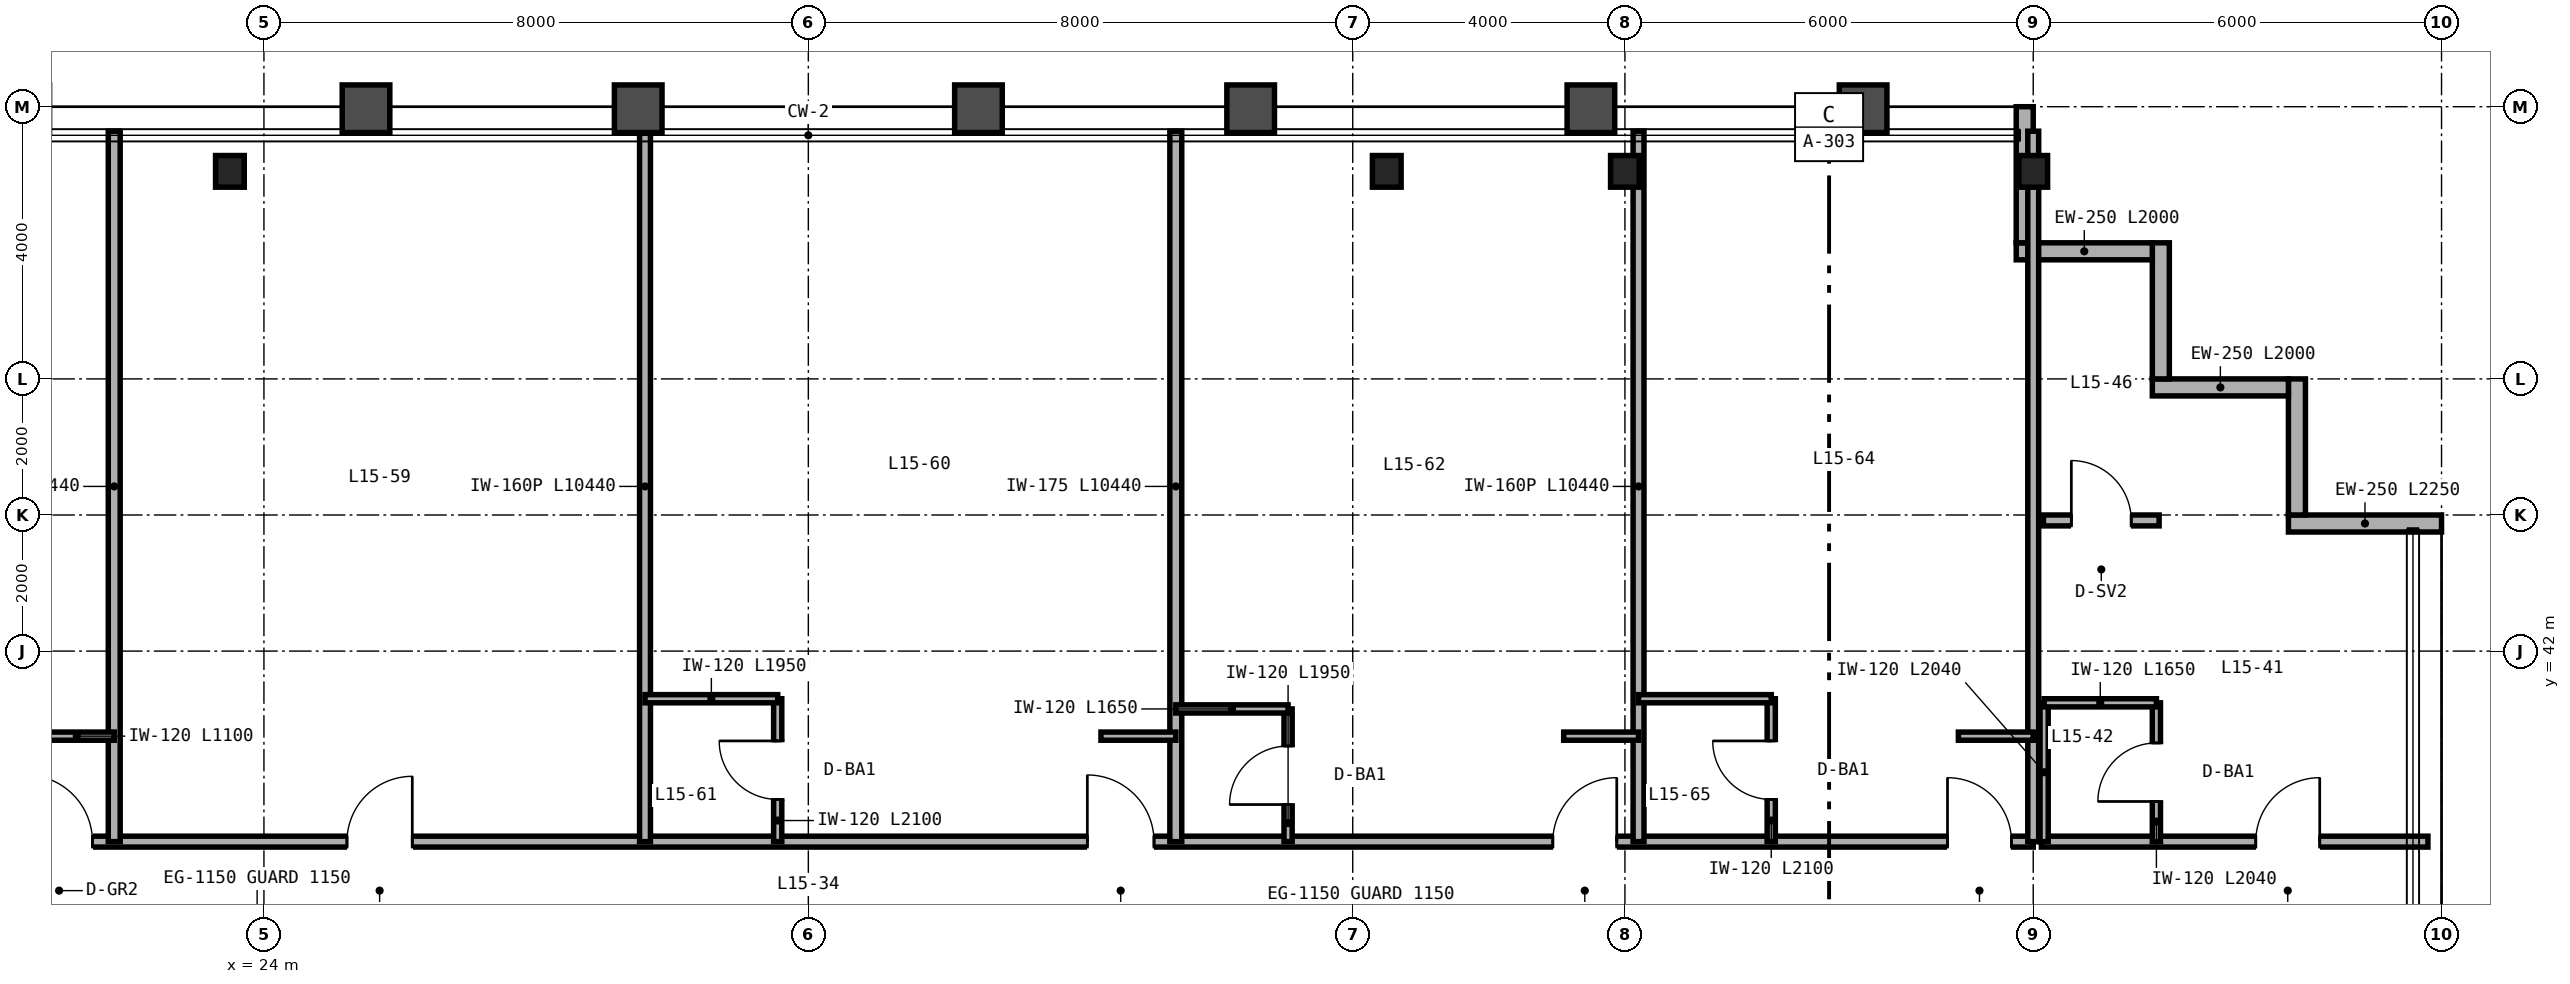
"""IFC4 building model, lengths in metres.
Left out: names, types, materials, properties, quantities, classifications, styles, units other than length and angle.
Written with IfcOpenShell. Run it as: python <this file> out.ifc"""

import sys

from ifc_helpers import new_model, si_unit, direction, frame, frame_2d, origin, origin_2d, place, context, subcontext, project, spatial, rectangle, i_section, extrude, source, transform, mapped, element, fill, save


model = new_model("IFC4")
c1 = context("Model", 3, precision=1e-05, world=origin(), true_north=direction((0.0, 1.0)))
c2 = subcontext(c1, "Body", "Model", "MODEL_VIEW")
j1 = project(units=[si_unit("LENGTHUNIT", "METRE"), si_unit("PLANEANGLEUNIT", "RADIAN")], contexts=[c1])
p1 = place(None, origin())
s1 = spatial("IfcSite", under=j1, at=p1, CompositionType="ELEMENT")
p2 = place(p1, origin())
s2 = spatial("IfcBuilding", under=s1, at=p2, CompositionType="ELEMENT")
p3 = place(p2, frame((0.0, 0.0, 63.6)))
s3 = spatial("IfcBuildingStorey", under=s2, at=p3, CompositionType="ELEMENT", Elevation=63.6)
m1 = source(origin(), c2, "Body", "SweptSolid", [
    extrude(i_section(OverallWidth=0.422, OverallDepth=0.465, WebThickness=0.045, FlangeThickness=0.073, FilletRadius=0.025, at=origin_2d()), origin(), (0.0, 0.0, 1.0), 3.35),
])
for number, where, z_axis, x_axis in (
    (1, (23.5, 49.05, 0.0), (0.0, 0.0, 1.0), (1.0, 0.0, 0.0)),
    (2, (40.5, 49.05, 0.0), (0.0, 0.0, 1.0), (1.0, 0.0, 0.0)),
    (3, (44.0, 49.05, 0.0), (0.0, 0.0, 1.0), (1.0, 0.0, 0.0)),
    (4, (50.0, 49.05, 0.0), (0.0, 0.0, 1.0), (1.0, 0.0, 0.0)),
):
    element("IfcColumn", number, at=place(p3, frame(where, z_axis=z_axis, x_axis=x_axis)), inside=s3, PredefinedType="COLUMN", context=c2, shape_type="MappedRepresentation", body=[
        mapped(m1, transform((0.0, 0.0, 0.0), scale=1.0)),
    ])
p4 = place(p3, frame((56.0, 43.875, 0.0), z_axis=(0.0, 0.0, 1.0), x_axis=(-1.0, 0.0, 0.0)))
e5 = element("IfcWall", 5, at=p4, inside=s3, PredefinedType="SOLIDWALL", context=c2, shape_type="SweptSolid", body=[
    extrude(rectangle(XDim=2.25, YDim=0.25, at=frame_2d((1.125, 0.0))), origin(), (0.0, 0.0, 1.0), 3.35),
])
for number, where, z_axis, x_axis in (
    (6, (53.875, 44.0, 0.0), (0.0, 0.0, 1.0), (0.0, 1.0, 0.0)),
    (7, (53.75, 45.875, 0.0), (0.0, 0.0, 1.0), (-1.0, 0.0, 0.0)),
    (8, (51.875, 46.0, 0.0), (0.0, 0.0, 1.0), (0.0, 1.0, 0.0)),
    (9, (51.75, 47.875, 0.0), (0.0, 0.0, 1.0), (-1.0, 0.0, 0.0)),
):
    element("IfcWall", number, at=place(p3, frame(where, z_axis=z_axis, x_axis=x_axis)), inside=s3, PredefinedType="SOLIDWALL", context=c2, shape_type="SweptSolid", body=[
        extrude(rectangle(XDim=2.0, YDim=0.25, at=frame_2d((1.0, 0.0))), origin(), (0.0, 0.0, 1.0), 3.35),
    ])
p5 = place(p3, frame((49.875, 48.0, 0.0), z_axis=(0.0, 0.0, 1.0), x_axis=(0.0, 1.0, 0.0)))
e10 = element("IfcWall", 10, at=p5, inside=s3, PredefinedType="SOLIDWALL", context=c2, shape_type="SweptSolid", body=[
    extrude(rectangle(XDim=2.0, YDim=0.25, at=frame_2d((1.0, 0.0))), origin(), (0.0, 0.0, 1.0), 2.657),
])
p6 = place(p3, frame((50.12, 39.2, 0.0), z_axis=(0.0, 0.0, 1.0), x_axis=(1.0, 0.0, 0.0)))
e11 = element("IfcWall", 11, at=p6, inside=s3, PredefinedType="PARTITIONING", context=c2, shape_type="SweptSolid", body=[
    extrude(rectangle(XDim=5.68, YDim=0.16, at=frame_2d((2.84, 0.0))), origin(), (0.0, 0.0, 1.0), 3.35),
])
p7 = place(p6, frame((3.15, 0.0, 0.0)))
e12 = element("IfcOpeningElement", 12, at=p7, cuts=e11, PredefinedType="OPENING", context=c2, shape_type="SweptSolid", body=[
    extrude(rectangle(XDim=0.94, YDim=2.15, at=frame_2d((0.47, 1.075))), frame((0.0, 0.09, 0.0), z_axis=(0.0, -1.0, 0.0), x_axis=(1.0, 0.0, 0.0)), (0.0, 0.0, 1.0), 0.18),
])
p8 = place(p3, frame((51.81, 39.2, 0.0), z_axis=(0.0, 0.0, 1.0), x_axis=(0.0, 1.0, 0.0)))
e13 = element("IfcWall", 13, at=p8, inside=s3, PredefinedType="PARTITIONING", context=c2, shape_type="SweptSolid", body=[
    extrude(rectangle(XDim=2.04, YDim=0.12, at=frame_2d((1.02, 0.0))), origin(), (0.0, 0.0, 1.0), 3.35),
])
p9 = place(p8, frame((0.59, 0.0, 0.0)))
e14 = element("IfcOpeningElement", 14, at=p9, cuts=e13, PredefinedType="OPENING", context=c2, shape_type="SweptSolid", body=[
    extrude(rectangle(XDim=0.86, YDim=2.1, at=frame_2d((0.43, 1.05))), frame((0.0, 0.07, 0.0), z_axis=(0.0, -1.0, 0.0), x_axis=(1.0, 0.0, 0.0)), (0.0, 0.0, 1.0), 0.14),
])
p10 = place(p3, frame((50.16, 39.2, 0.0), z_axis=(0.0, 0.0, 1.0), x_axis=(0.0, 1.0, 0.0)))
e15 = element("IfcWall", 15, at=p10, inside=s3, PredefinedType="PARTITIONING", context=c2, shape_type="SweptSolid", body=[
    extrude(rectangle(XDim=2.04, YDim=0.12, at=frame_2d((1.02, 0.0))), origin(), (0.0, 0.0, 1.0), 3.35),
])
p11 = place(p3, frame((50.16, 41.24, 0.0), z_axis=(0.0, 0.0, 1.0), x_axis=(1.0, 0.0, 0.0)))
e16 = element("IfcWall", 16, at=p11, inside=s3, PredefinedType="PARTITIONING", context=c2, shape_type="SweptSolid", body=[
    extrude(rectangle(XDim=1.65, YDim=0.12, at=frame_2d((0.825, 0.0))), origin(), (0.0, 0.0, 1.0), 3.35),
])
p12 = place(p3, frame((50.15, 43.92, 0.0), z_axis=(0.0, 0.0, 1.0), x_axis=(1.0, 0.0, 0.0)))
e17 = element("IfcWall", 17, at=p12, inside=s3, PredefinedType="PARTITIONING", context=c2, shape_type="SweptSolid", body=[
    extrude(rectangle(XDim=1.7, YDim=0.16, at=frame_2d((0.85, 0.0))), origin(), (0.0, 0.0, 1.0), 3.35),
])
p13 = place(p12, frame((0.41, 0.0, 0.0)))
e18 = element("IfcOpeningElement", 18, at=p13, cuts=e17, PredefinedType="OPENING", context=c2, shape_type="SweptSolid", body=[
    extrude(rectangle(XDim=0.88, YDim=2.15, at=frame_2d((0.44, 1.075))), frame((0.0, 0.09, 0.0), z_axis=(0.0, -1.0, 0.0), x_axis=(1.0, 0.0, 0.0)), (0.0, 0.0, 1.0), 0.18),
])
p14 = place(p3, frame((14.0, 39.2, 0.0), z_axis=(0.0, 0.0, 1.0), x_axis=(1.0, 0.0, 0.0)))
e19 = element("IfcWall", 19, at=p14, inside=s3, PredefinedType="PARTITIONING", context=c2, shape_type="SweptSolid", body=[
    extrude(rectangle(XDim=36.0, YDim=0.16, at=frame_2d((18.0, 0.0))), origin(), (0.0, 0.0, 1.0), 2.571),
])
p15 = place(p14, frame((6.5, 0.0, 0.0)))
e20 = element("IfcOpeningElement", 20, at=p15, cuts=e19, PredefinedType="OPENING", context=c2, shape_type="SweptSolid", body=[
    extrude(rectangle(XDim=0.98, YDim=2.2, at=frame_2d((0.49, 1.1))), frame((0.0, 0.09, 0.0), z_axis=(0.0, -1.0, 0.0), x_axis=(1.0, 0.0, 0.0)), (0.0, 0.0, 1.0), 0.18),
])
p16 = place(p14, frame((11.22, 0.0, 0.0)))
e21 = element("IfcOpeningElement", 21, at=p16, cuts=e19, PredefinedType="OPENING", context=c2, shape_type="SweptSolid", body=[
    extrude(rectangle(XDim=0.96, YDim=2.15, at=frame_2d((0.48, 1.075))), frame((0.0, 0.09, 0.0), z_axis=(0.0, -1.0, 0.0), x_axis=(1.0, 0.0, 0.0)), (0.0, 0.0, 1.0), 0.18),
])
p17 = place(p14, frame((22.1, 0.0, 0.0)))
e22 = element("IfcOpeningElement", 22, at=p17, cuts=e19, PredefinedType="OPENING", context=c2, shape_type="SweptSolid", body=[
    extrude(rectangle(XDim=0.98, YDim=2.2, at=frame_2d((0.49, 1.1))), frame((0.0, 0.09, 0.0), z_axis=(0.0, -1.0, 0.0), x_axis=(1.0, 0.0, 0.0)), (0.0, 0.0, 1.0), 0.18),
])
p18 = place(p14, frame((28.94, 0.0, 0.0)))
e23 = element("IfcOpeningElement", 23, at=p18, cuts=e19, PredefinedType="OPENING", context=c2, shape_type="SweptSolid", body=[
    extrude(rectangle(XDim=0.94, YDim=2.15, at=frame_2d((0.47, 1.075))), frame((0.0, 0.09, 0.0), z_axis=(0.0, -1.0, 0.0), x_axis=(1.0, 0.0, 0.0)), (0.0, 0.0, 1.0), 0.18),
])
p19 = place(p14, frame((34.74, 0.0, 0.0)))
e24 = element("IfcOpeningElement", 24, at=p19, cuts=e19, PredefinedType="OPENING", context=c2, shape_type="SweptSolid", body=[
    extrude(rectangle(XDim=0.94, YDim=2.15, at=frame_2d((0.47, 1.075))), frame((0.0, 0.09, 0.0), z_axis=(0.0, -1.0, 0.0), x_axis=(1.0, 0.0, 0.0)), (0.0, 0.0, 1.0), 0.18),
])
p20 = place(p3, frame((50.0, 39.2, 0.0), z_axis=(0.0, 0.0, 1.0), x_axis=(0.0, 1.0, 0.0)))
e25 = element("IfcWall", 25, at=p20, inside=s3, PredefinedType="PARTITIONING", context=c2, shape_type="SweptSolid", body=[
    extrude(rectangle(XDim=10.44, YDim=0.16, at=frame_2d((5.22, 0.0))), origin(), (0.0, 0.0, 1.0), 2.657),
])
p21 = place(p3, frame((21.8, 39.2, 0.0), z_axis=(0.0, 0.0, 1.0), x_axis=(0.0, 1.0, 0.0)))
e26 = element("IfcWall", 26, at=p21, inside=s3, PredefinedType="PARTITIONING", context=c2, shape_type="SweptSolid", body=[
    extrude(rectangle(XDim=10.44, YDim=0.175, at=frame_2d((5.22, 0.0))), origin(), (0.0, 0.0, 1.0), 2.813),
])
p22 = place(p3, frame((20.7, 40.75, 0.0), z_axis=(0.0, 0.0, 1.0), x_axis=(1.0, 0.0, 0.0)))
e27 = element("IfcWall", 27, at=p22, inside=s3, PredefinedType="PARTITIONING", context=c2, shape_type="SweptSolid", body=[
    extrude(rectangle(XDim=1.1, YDim=0.12, at=frame_2d((0.55, 0.0))), origin(), (0.0, 0.0, 1.0), 3.35),
])
p23 = place(p3, frame((29.6, 39.2, 0.0), z_axis=(0.0, 0.0, 1.0), x_axis=(0.0, 1.0, 0.0)))
e28 = element("IfcWall", 28, at=p23, inside=s3, PredefinedType="PARTITIONING", context=c2, shape_type="SweptSolid", body=[
    extrude(rectangle(XDim=10.44, YDim=0.16, at=frame_2d((5.22, 0.0))), origin(), (0.0, 0.0, 1.0), 2.423),
])
p24 = place(p3, frame((37.4, 39.2, 0.0), z_axis=(0.0, 0.0, 1.0), x_axis=(0.0, 1.0, 0.0)))
e29 = element("IfcWall", 29, at=p24, inside=s3, PredefinedType="PARTITIONING", context=c2, shape_type="SweptSolid", body=[
    extrude(rectangle(XDim=10.44, YDim=0.175, at=frame_2d((5.22, 0.0))), origin(), (0.0, 0.0, 1.0), 2.423),
])
p25 = place(p3, frame((31.55, 39.2, 0.0), z_axis=(0.0, 0.0, 1.0), x_axis=(0.0, 1.0, 0.0)))
e30 = element("IfcWall", 30, at=p25, inside=s3, PredefinedType="PARTITIONING", context=c2, shape_type="SweptSolid", body=[
    extrude(rectangle(XDim=2.1, YDim=0.12, at=frame_2d((1.05, 0.0))), origin(), (0.0, 0.0, 1.0), 3.35),
])
p26 = place(p25, frame((0.62, 0.0, 0.0)))
e31 = element("IfcOpeningElement", 31, at=p26, cuts=e30, PredefinedType="OPENING", context=c2, shape_type="SweptSolid", body=[
    extrude(rectangle(XDim=0.86, YDim=2.1, at=frame_2d((0.43, 1.05))), frame((0.0, 0.07, 0.0), z_axis=(0.0, -1.0, 0.0), x_axis=(1.0, 0.0, 0.0)), (0.0, 0.0, 1.0), 0.14),
])
p27 = place(p3, frame((29.6, 41.3, 0.0), z_axis=(0.0, 0.0, 1.0), x_axis=(1.0, 0.0, 0.0)))
e32 = element("IfcWall", 32, at=p27, inside=s3, PredefinedType="PARTITIONING", context=c2, shape_type="SweptSolid", body=[
    extrude(rectangle(XDim=1.95, YDim=0.12, at=frame_2d((0.975, 0.0))), origin(), (0.0, 0.0, 1.0), 3.35),
])
p28 = place(p3, frame((36.3, 40.75, 0.0), z_axis=(0.0, 0.0, 1.0), x_axis=(1.0, 0.0, 0.0)))
e33 = element("IfcWall", 33, at=p28, inside=s3, PredefinedType="PARTITIONING", context=c2, shape_type="SweptSolid", body=[
    extrude(rectangle(XDim=1.1, YDim=0.12, at=frame_2d((0.55, 0.0))), origin(), (0.0, 0.0, 1.0), 3.35),
])
p29 = place(p3, frame((44.2, 39.2, 0.0), z_axis=(0.0, 0.0, 1.0), x_axis=(0.0, 1.0, 0.0)))
e34 = element("IfcWall", 34, at=p29, inside=s3, PredefinedType="PARTITIONING", context=c2, shape_type="SweptSolid", body=[
    extrude(rectangle(XDim=10.44, YDim=0.16, at=frame_2d((5.22, 0.0))), origin(), (0.0, 0.0, 1.0), 2.657),
])
p30 = place(p3, frame((39.05, 39.2, 0.0), z_axis=(0.0, 0.0, 1.0), x_axis=(0.0, 1.0, 0.0)))
e35 = element("IfcWall", 35, at=p30, inside=s3, PredefinedType="PARTITIONING", context=c2, shape_type="SweptSolid", body=[
    extrude(rectangle(XDim=1.95, YDim=0.12, at=frame_2d((0.975, 0.0))), origin(), (0.0, 0.0, 1.0), 3.35),
])
p31 = place(p30, frame((0.545, 0.0, 0.0)))
e36 = element("IfcOpeningElement", 36, at=p31, cuts=e35, PredefinedType="OPENING", context=c2, shape_type="SweptSolid", body=[
    extrude(rectangle(XDim=0.86, YDim=2.1, at=frame_2d((0.43, 1.05))), frame((0.0, 0.07, 0.0), z_axis=(0.0, -1.0, 0.0), x_axis=(1.0, 0.0, 0.0)), (0.0, 0.0, 1.0), 0.14),
])
p32 = place(p3, frame((37.4, 41.15, 0.0), z_axis=(0.0, 0.0, 1.0), x_axis=(1.0, 0.0, 0.0)))
e37 = element("IfcWall", 37, at=p32, inside=s3, PredefinedType="PARTITIONING", context=c2, shape_type="SweptSolid", body=[
    extrude(rectangle(XDim=1.65, YDim=0.12, at=frame_2d((0.825, 0.0))), origin(), (0.0, 0.0, 1.0), 3.35),
])
p33 = place(p3, frame((43.1, 40.75, 0.0), z_axis=(0.0, 0.0, 1.0), x_axis=(1.0, 0.0, 0.0)))
e38 = element("IfcWall", 38, at=p33, inside=s3, PredefinedType="PARTITIONING", context=c2, shape_type="SweptSolid", body=[
    extrude(rectangle(XDim=1.1, YDim=0.12, at=frame_2d((0.55, 0.0))), origin(), (0.0, 0.0, 1.0), 3.35),
])
p34 = place(p3, frame((46.15, 39.2, 0.0), z_axis=(0.0, 0.0, 1.0), x_axis=(0.0, 1.0, 0.0)))
e39 = element("IfcWall", 39, at=p34, inside=s3, PredefinedType="PARTITIONING", context=c2, shape_type="SweptSolid", body=[
    extrude(rectangle(XDim=2.1, YDim=0.12, at=frame_2d((1.05, 0.0))), origin(), (0.0, 0.0, 1.0), 3.35),
])
p35 = place(p34, frame((0.62, 0.0, 0.0)))
e40 = element("IfcOpeningElement", 40, at=p35, cuts=e39, PredefinedType="OPENING", context=c2, shape_type="SweptSolid", body=[
    extrude(rectangle(XDim=0.86, YDim=2.1, at=frame_2d((0.43, 1.05))), frame((0.0, 0.07, 0.0), z_axis=(0.0, -1.0, 0.0), x_axis=(1.0, 0.0, 0.0)), (0.0, 0.0, 1.0), 0.14),
])
p36 = place(p3, frame((44.2, 41.3, 0.0), z_axis=(0.0, 0.0, 1.0), x_axis=(1.0, 0.0, 0.0)))
e41 = element("IfcWall", 41, at=p36, inside=s3, PredefinedType="PARTITIONING", context=c2, shape_type="SweptSolid", body=[
    extrude(rectangle(XDim=1.95, YDim=0.12, at=frame_2d((0.975, 0.0))), origin(), (0.0, 0.0, 1.0), 3.35),
])
p37 = place(p3, frame((48.9, 40.75, 0.0), z_axis=(0.0, 0.0, 1.0), x_axis=(1.0, 0.0, 0.0)))
e42 = element("IfcWall", 42, at=p37, inside=s3, PredefinedType="PARTITIONING", context=c2, shape_type="SweptSolid", body=[
    extrude(rectangle(XDim=1.1, YDim=0.12, at=frame_2d((0.55, 0.0))), origin(), (0.0, 0.0, 1.0), 3.35),
])
m2 = source(origin(), c2, "Body", "SweptSolid", [
    extrude(rectangle(XDim=0.86, YDim=2.1, at=frame_2d((0.43, 1.05))), frame((0.0, 0.025, 0.0), z_axis=(0.0, -1.0, 0.0), x_axis=(1.0, 0.0, 0.0)), (0.0, 0.0, 1.0), 0.05),
])
p38 = place(p9, origin())
e43 = element("IfcDoor", 43, at=p38, inside=s3, OperationType="SINGLE_SWING_LEFT", PredefinedType="DOOR", context=c2, shape_type="MappedRepresentation", body=[
    mapped(m2, transform((0.0, 0.0, 0.0), scale=1.0)),
])
fill(e14, e43)
m3 = source(origin(), c2, "Body", "SweptSolid", [
    extrude(rectangle(XDim=0.94, YDim=2.15, at=frame_2d((0.47, 1.075))), frame((0.0, 0.025, 0.0), z_axis=(0.0, -1.0, 0.0), x_axis=(1.0, 0.0, 0.0)), (0.0, 0.0, 1.0), 0.05),
])
p39 = place(p7, origin())
e44 = element("IfcDoor", 44, at=p39, inside=s3, OperationType="SINGLE_SWING_RIGHT", PredefinedType="DOOR", context=c2, shape_type="MappedRepresentation", body=[
    mapped(m3, transform((0.0, 0.0, 0.0), scale=1.0)),
])
fill(e12, e44)
m4 = source(origin(), c2, "Body", "SweptSolid", [
    extrude(rectangle(XDim=0.88, YDim=2.15, at=frame_2d((0.44, 1.075))), frame((0.0, 0.025, 0.0), z_axis=(0.0, -1.0, 0.0), x_axis=(1.0, 0.0, 0.0)), (0.0, 0.0, 1.0), 0.05),
])
p40 = place(p13, origin())
e45 = element("IfcDoor", 45, at=p40, inside=s3, OperationType="SINGLE_SWING_LEFT", PredefinedType="DOOR", context=c2, shape_type="MappedRepresentation", body=[
    mapped(m4, transform((0.0, 0.0, 0.0), scale=1.0)),
])
fill(e18, e45)
p41 = place(p26, origin())
e46 = element("IfcDoor", 46, at=p41, inside=s3, OperationType="SINGLE_SWING_RIGHT", PredefinedType="DOOR", context=c2, shape_type="MappedRepresentation", body=[
    mapped(m2, transform((0.0, 0.0, 0.0), scale=1.0)),
])
fill(e31, e46)
p42 = place(p31, origin())
e47 = element("IfcDoor", 47, at=p42, inside=s3, OperationType="SINGLE_SWING_LEFT", PredefinedType="DOOR", context=c2, shape_type="MappedRepresentation", body=[
    mapped(m2, transform((0.0, 0.0, 0.0), scale=1.0)),
])
fill(e36, e47)
p43 = place(p35, origin())
e48 = element("IfcDoor", 48, at=p43, inside=s3, OperationType="SINGLE_SWING_RIGHT", PredefinedType="DOOR", context=c2, shape_type="MappedRepresentation", body=[
    mapped(m2, transform((0.0, 0.0, 0.0), scale=1.0)),
])
fill(e40, e48)
m5 = source(origin(), c2, "Body", "SweptSolid", [
    extrude(rectangle(XDim=0.98, YDim=2.2, at=frame_2d((0.49, 1.1))), frame((0.0, 0.025, 0.0), z_axis=(0.0, -1.0, 0.0), x_axis=(1.0, 0.0, 0.0)), (0.0, 0.0, 1.0), 0.05),
])
p44 = place(p15, origin())
e49 = element("IfcDoor", 49, at=p44, inside=s3, OperationType="SINGLE_SWING_LEFT", PredefinedType="DOOR", context=c2, shape_type="MappedRepresentation", body=[
    mapped(m5, transform((0.0, 0.0, 0.0), scale=1.0)),
])
fill(e20, e49)
m6 = source(origin(), c2, "Body", "SweptSolid", [
    extrude(rectangle(XDim=0.96, YDim=2.15, at=frame_2d((0.48, 1.075))), frame((0.0, 0.025, 0.0), z_axis=(0.0, -1.0, 0.0), x_axis=(1.0, 0.0, 0.0)), (0.0, 0.0, 1.0), 0.05),
])
p45 = place(p16, origin())
e50 = element("IfcDoor", 50, at=p45, inside=s3, OperationType="SINGLE_SWING_RIGHT", PredefinedType="DOOR", context=c2, shape_type="MappedRepresentation", body=[
    mapped(m6, transform((0.0, 0.0, 0.0), scale=1.0)),
])
fill(e21, e50)
p46 = place(p17, origin())
e51 = element("IfcDoor", 51, at=p46, inside=s3, OperationType="SINGLE_SWING_LEFT", PredefinedType="DOOR", context=c2, shape_type="MappedRepresentation", body=[
    mapped(m5, transform((0.0, 0.0, 0.0), scale=1.0)),
])
fill(e22, e51)
p47 = place(p18, origin())
e52 = element("IfcDoor", 52, at=p47, inside=s3, OperationType="SINGLE_SWING_RIGHT", PredefinedType="DOOR", context=c2, shape_type="MappedRepresentation", body=[
    mapped(m3, transform((0.0, 0.0, 0.0), scale=1.0)),
])
fill(e23, e52)
p48 = place(p19, origin())
e53 = element("IfcDoor", 53, at=p48, inside=s3, OperationType="SINGLE_SWING_LEFT", PredefinedType="DOOR", context=c2, shape_type="MappedRepresentation", body=[
    mapped(m3, transform((0.0, 0.0, 0.0), scale=1.0)),
])
fill(e24, e53)
save(model, sys.argv[1])
